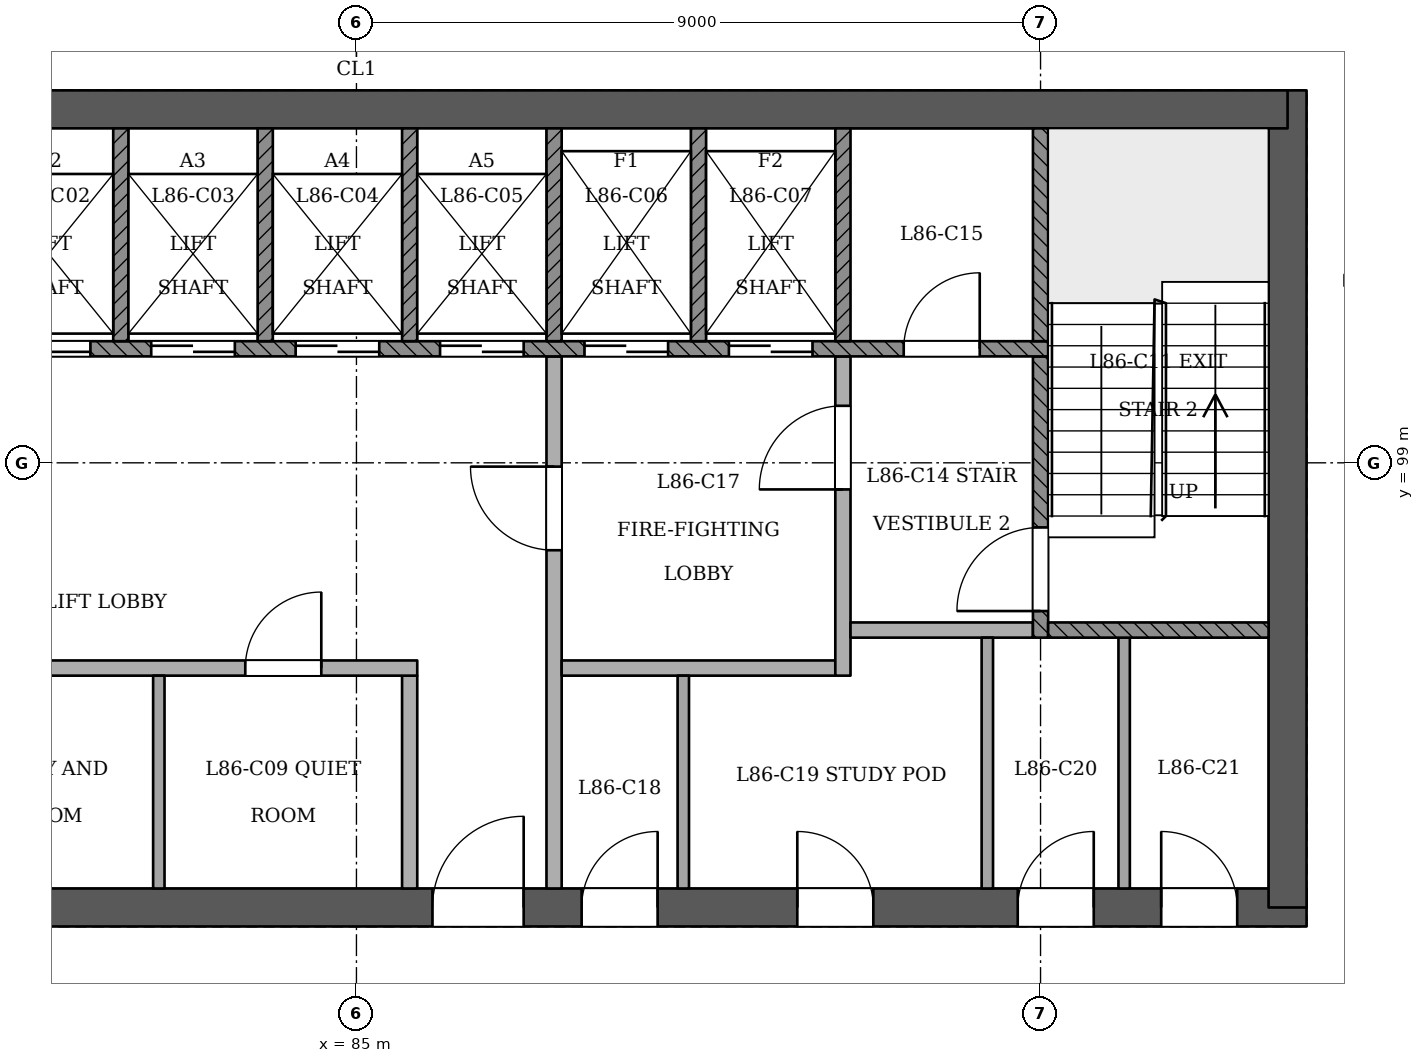
"""IFC4 building model, lengths in metres.
Left out: names, types, materials, properties, quantities, classifications, styles, units other than length and angle.
Written with IfcOpenShell. Run it as: python <this file> out.ifc"""

import sys

from ifc_helpers import new_model, si_unit, direction, frame, frame_2d, origin, place, context, subcontext, project, spatial, rectangle, extrude, element, fill, save


model = new_model("IFC4")
c1 = context("Model", 3, precision=1e-05, world=origin(), true_north=direction((0.0, 1.0)))
c2 = subcontext(c1, "Body", "Model", "MODEL_VIEW")
j1 = project(units=[si_unit("LENGTHUNIT", "METRE"), si_unit("PLANEANGLEUNIT", "RADIAN")], contexts=[c1])
p1 = place(None, origin())
s1 = spatial("IfcSite", under=j1, at=p1, CompositionType="ELEMENT")
p2 = place(p1, origin())
s2 = spatial("IfcBuilding", under=s1, at=p2, CompositionType="ELEMENT")
p3 = place(p2, frame((0.0, 0.0, 331.0)))
s3 = spatial("IfcBuildingStorey", under=s2, at=p3, CompositionType="ELEMENT", Elevation=331.0)
p4 = place(p3, frame((72.75, 93.15, 0.0), z_axis=(0.0, 0.0, 1.0), x_axis=(1.0, 0.0, 0.0)))
e1 = element("IfcWall", 1, at=p4, inside=s3, PredefinedType="SHEAR", context=c2, shape_type="SweptSolid", body=[
    extrude(rectangle(XDim=24.75, YDim=0.5, at=frame_2d((12.375, 0.0))), origin(), (0.0, 0.0, 1.0), 3.6),
])
p5 = place(p4, frame((1.05, 0.0, 0.0)))
e2 = element("IfcOpeningElement", 2, at=p5, cuts=e1, PredefinedType="OPENING", context=c2, shape_type="SweptSolid", body=[
    extrude(rectangle(XDim=1.2, YDim=2.1, at=frame_2d((0.6, 1.05))), frame((0.0, 0.26, 0.0), z_axis=(0.0, -1.0, 0.0), x_axis=(1.0, 0.0, 0.0)), (0.0, 0.0, 1.0), 0.521),
])
p6 = place(p4, frame((3.25, 0.0, 0.0)))
e3 = element("IfcOpeningElement", 3, at=p6, cuts=e1, PredefinedType="OPENING", context=c2, shape_type="SweptSolid", body=[
    extrude(rectangle(XDim=1.2, YDim=2.1, at=frame_2d((0.6, 1.05))), frame((0.0, 0.26, 0.0), z_axis=(0.0, -1.0, 0.0), x_axis=(1.0, 0.0, 0.0)), (0.0, 0.0, 1.0), 0.521),
])
p7 = place(p4, frame((13.25, 0.0, 0.0)))
e4 = element("IfcOpeningElement", 4, at=p7, cuts=e1, PredefinedType="OPENING", context=c2, shape_type="SweptSolid", body=[
    extrude(rectangle(XDim=1.2, YDim=2.1, at=frame_2d((0.6, 1.05))), frame((0.0, 0.26, 0.0), z_axis=(0.0, -1.0, 0.0), x_axis=(1.0, 0.0, 0.0)), (0.0, 0.0, 1.0), 0.521),
])
p8 = place(p4, frame((15.212, 0.0, 0.0)))
e5 = element("IfcOpeningElement", 5, at=p8, cuts=e1, PredefinedType="OPENING", context=c2, shape_type="SweptSolid", body=[
    extrude(rectangle(XDim=1.0, YDim=2.1, at=frame_2d((0.5, 1.05))), frame((0.0, 0.26, 0.0), z_axis=(0.0, -1.0, 0.0), x_axis=(1.0, 0.0, 0.0)), (0.0, 0.0, 1.0), 0.521),
])
p9 = place(p4, frame((18.05, 0.0, 0.0)))
e6 = element("IfcOpeningElement", 6, at=p9, cuts=e1, PredefinedType="OPENING", context=c2, shape_type="SweptSolid", body=[
    extrude(rectangle(XDim=1.0, YDim=2.1, at=frame_2d((0.5, 1.05))), frame((0.0, 0.26, 0.0), z_axis=(0.0, -1.0, 0.0), x_axis=(1.0, 0.0, 0.0)), (0.0, 0.0, 1.0), 0.521),
])
p10 = place(p4, frame((20.95, 0.0, 0.0)))
e7 = element("IfcOpeningElement", 7, at=p10, cuts=e1, PredefinedType="OPENING", context=c2, shape_type="SweptSolid", body=[
    extrude(rectangle(XDim=1.0, YDim=2.1, at=frame_2d((0.5, 1.05))), frame((0.0, 0.26, 0.0), z_axis=(0.0, -1.0, 0.0), x_axis=(1.0, 0.0, 0.0)), (0.0, 0.0, 1.0), 0.521),
])
p11 = place(p4, frame((22.837, 0.0, 0.0)))
e8 = element("IfcOpeningElement", 8, at=p11, cuts=e1, PredefinedType="OPENING", context=c2, shape_type="SweptSolid", body=[
    extrude(rectangle(XDim=1.0, YDim=2.1, at=frame_2d((0.5, 1.05))), frame((0.0, 0.26, 0.0), z_axis=(0.0, -1.0, 0.0), x_axis=(1.0, 0.0, 0.0)), (0.0, 0.0, 1.0), 0.521),
])
p12 = place(p3, frame((97.25, 93.15, 0.0), z_axis=(0.0, 0.0, 1.0), x_axis=(0.0, 1.0, 0.0)))
e9 = element("IfcWall", 9, at=p12, inside=s3, PredefinedType="SHEAR", context=c2, shape_type="SweptSolid", body=[
    extrude(rectangle(XDim=10.75, YDim=0.5, at=frame_2d((5.375, 0.0))), origin(), (0.0, 0.0, 1.0), 3.6),
])
p13 = place(p3, frame((97.25, 103.65, 0.0), z_axis=(0.0, 0.0, 1.0), x_axis=(-1.0, 0.0, 0.0)))
e10 = element("IfcWall", 10, at=p13, inside=s3, PredefinedType="SHEAR", context=c2, shape_type="SweptSolid", body=[
    extrude(rectangle(XDim=24.75, YDim=0.5, at=frame_2d((12.375, 0.0))), origin(), (0.0, 0.0, 1.0), 3.6),
])
p14 = place(p3, frame((82.4, 93.4, 0.0), z_axis=(0.0, 0.0, 1.0), x_axis=(0.0, 1.0, 0.0)))
e11 = element("IfcWall", 11, at=p14, inside=s3, PredefinedType="PARTITIONING", context=c2, shape_type="SweptSolid", body=[
    extrude(rectangle(XDim=2.8, YDim=0.15, at=frame_2d((1.4, 0.0))), origin(), (0.0, 0.0, 1.0), 3.3),
])
p15 = place(p3, frame((85.7, 93.4, 0.0), z_axis=(0.0, 0.0, 1.0), x_axis=(0.0, 1.0, 0.0)))
e12 = element("IfcWall", 12, at=p15, inside=s3, PredefinedType="PARTITIONING", context=c2, shape_type="SweptSolid", body=[
    extrude(rectangle(XDim=2.8, YDim=0.2, at=frame_2d((1.4, 0.0))), origin(), (0.0, 0.0, 1.0), 3.3),
])
p16 = place(p3, frame((87.6, 93.4, 0.0), z_axis=(0.0, 0.0, 1.0), x_axis=(0.0, 1.0, 0.0)))
e13 = element("IfcWall", 13, at=p16, inside=s3, PredefinedType="PARTITIONING", context=c2, shape_type="SweptSolid", body=[
    extrude(rectangle(XDim=7.0, YDim=0.2, at=frame_2d((3.5, 0.0))), origin(), (0.0, 0.0, 1.0), 3.3),
])
p17 = place(p16, frame((4.45, 0.0, 0.0)))
e14 = element("IfcOpeningElement", 14, at=p17, cuts=e13, PredefinedType="OPENING", context=c2, shape_type="SweptSolid", body=[
    extrude(rectangle(XDim=1.1, YDim=2.1, at=frame_2d((0.55, 1.05))), frame((0.0, 0.11, 0.0), z_axis=(0.0, -1.0, 0.0), x_axis=(1.0, 0.0, 0.0)), (0.0, 0.0, 1.0), 0.221),
])
p18 = place(p3, frame((89.3, 93.4, 0.0), z_axis=(0.0, 0.0, 1.0), x_axis=(0.0, 1.0, 0.0)))
e15 = element("IfcWall", 15, at=p18, inside=s3, PredefinedType="PARTITIONING", context=c2, shape_type="SweptSolid", body=[
    extrude(rectangle(XDim=2.8, YDim=0.15, at=frame_2d((1.4, 0.0))), origin(), (0.0, 0.0, 1.0), 3.3),
])
for number, where, z_axis, x_axis in (
    (16, (93.3, 93.4, 0.0), (0.0, 0.0, 1.0), (0.0, 1.0, 0.0)),
    (17, (95.1, 93.4, 0.0), (0.0, 0.0, 1.0), (0.0, 1.0, 0.0)),
):
    element("IfcWall", number, at=place(p3, frame(where, z_axis=z_axis, x_axis=x_axis)), inside=s3, PredefinedType="PARTITIONING", context=c2, shape_type="SweptSolid", body=[
        extrude(rectangle(XDim=3.3, YDim=0.15, at=frame_2d((1.65, 0.0))), origin(), (0.0, 0.0, 1.0), 3.3),
    ])
p19 = place(p3, frame((78.0, 96.3, 0.0), z_axis=(0.0, 0.0, 1.0), x_axis=(1.0, 0.0, 0.0)))
e18 = element("IfcWall", 18, at=p19, inside=s3, PredefinedType="PARTITIONING", context=c2, shape_type="SweptSolid", body=[
    extrude(rectangle(XDim=7.8, YDim=0.2, at=frame_2d((3.9, 0.0))), origin(), (0.0, 0.0, 1.0), 3.3),
])
p20 = place(p19, frame((1.762, 0.0, 0.0)))
e19 = element("IfcOpeningElement", 19, at=p20, cuts=e18, PredefinedType="OPENING", context=c2, shape_type="SweptSolid", body=[
    extrude(rectangle(XDim=1.0, YDim=2.1, at=frame_2d((0.5, 1.05))), frame((0.0, 0.11, 0.0), z_axis=(0.0, -1.0, 0.0), x_axis=(1.0, 0.0, 0.0)), (0.0, 0.0, 1.0), 0.221),
])
p21 = place(p19, frame((5.538, 0.0, 0.0)))
e20 = element("IfcOpeningElement", 20, at=p21, cuts=e18, PredefinedType="OPENING", context=c2, shape_type="SweptSolid", body=[
    extrude(rectangle(XDim=1.0, YDim=2.1, at=frame_2d((0.5, 1.05))), frame((0.0, 0.11, 0.0), z_axis=(0.0, -1.0, 0.0), x_axis=(1.0, 0.0, 0.0)), (0.0, 0.0, 1.0), 0.221),
])
p22 = place(p3, frame((87.7, 96.3, 0.0), z_axis=(0.0, 0.0, 1.0), x_axis=(1.0, 0.0, 0.0)))
e21 = element("IfcWall", 21, at=p22, inside=s3, PredefinedType="PARTITIONING", context=c2, shape_type="SweptSolid", body=[
    extrude(rectangle(XDim=3.6, YDim=0.2, at=frame_2d((1.8, 0.0))), origin(), (0.0, 0.0, 1.0), 3.3),
])
p23 = place(p3, frame((91.4, 96.2, 0.0), z_axis=(0.0, 0.0, 1.0), x_axis=(0.0, 1.0, 0.0)))
e22 = element("IfcWall", 22, at=p23, inside=s3, PredefinedType="PARTITIONING", context=c2, shape_type="SweptSolid", body=[
    extrude(rectangle(XDim=4.2, YDim=0.2, at=frame_2d((2.1, 0.0))), origin(), (0.0, 0.0, 1.0), 3.3),
])
p24 = place(p23, frame((2.45, 0.0, 0.0)))
e23 = element("IfcOpeningElement", 23, at=p24, cuts=e22, PredefinedType="OPENING", context=c2, shape_type="SweptSolid", body=[
    extrude(rectangle(XDim=1.1, YDim=2.1, at=frame_2d((0.55, 1.05))), frame((0.0, 0.11, 0.0), z_axis=(0.0, -1.0, 0.0), x_axis=(1.0, 0.0, 0.0)), (0.0, 0.0, 1.0), 0.221),
])
p25 = place(p3, frame((91.5, 96.8, 0.0), z_axis=(0.0, 0.0, 1.0), x_axis=(1.0, 0.0, 0.0)))
e24 = element("IfcWall", 24, at=p25, inside=s3, PredefinedType="PARTITIONING", context=c2, shape_type="SweptSolid", body=[
    extrude(rectangle(XDim=2.4, YDim=0.2, at=frame_2d((1.2, 0.0))), origin(), (0.0, 0.0, 1.0), 3.3),
])
p26 = place(p3, frame((94.0, 96.7, 0.0), z_axis=(0.0, 0.0, 1.0), x_axis=(0.0, 1.0, 0.0)))
e25 = element("IfcWall", 25, at=p26, inside=s3, PredefinedType="SOLIDWALL", context=c2, shape_type="SweptSolid", body=[
    extrude(rectangle(XDim=3.7, YDim=0.2, at=frame_2d((1.85, 0.0))), origin(), (0.0, 0.0, 1.0), 3.3),
])
p27 = place(p26, frame((0.35, 0.0, 0.0)))
e26 = element("IfcOpeningElement", 26, at=p27, cuts=e25, PredefinedType="OPENING", context=c2, shape_type="SweptSolid", body=[
    extrude(rectangle(XDim=1.1, YDim=2.1, at=frame_2d((0.55, 1.05))), frame((0.0, 0.11, 0.0), z_axis=(0.0, -1.0, 0.0), x_axis=(1.0, 0.0, 0.0)), (0.0, 0.0, 1.0), 0.221),
])
p28 = place(p3, frame((94.1, 96.8, 0.0), z_axis=(0.0, 0.0, 1.0), x_axis=(1.0, 0.0, 0.0)))
e27 = element("IfcWall", 27, at=p28, inside=s3, PredefinedType="SOLIDWALL", context=c2, shape_type="SweptSolid", body=[
    extrude(rectangle(XDim=2.9, YDim=0.2, at=frame_2d((1.45, 0.0))), origin(), (0.0, 0.0, 1.0), 3.3),
])
p29 = place(p3, frame((75.9, 100.5, 0.0), z_axis=(0.0, 0.0, 1.0), x_axis=(1.0, 0.0, 0.0)))
e28 = element("IfcWall", 28, at=p29, inside=s3, PredefinedType="SOLIDWALL", context=c2, shape_type="SweptSolid", body=[
    extrude(rectangle(XDim=18.2, YDim=0.2, at=frame_2d((9.1, 0.0))), origin(), (0.0, 0.0, 1.0), 3.3),
])
p30 = place(p29, frame((2.6, 0.0, 0.0)))
e29 = element("IfcOpeningElement", 29, at=p30, cuts=e28, PredefinedType="OPENING", context=c2, shape_type="SweptSolid", body=[
    extrude(rectangle(XDim=1.1, YDim=2.1, at=frame_2d((0.55, 1.05))), frame((0.0, 0.11, 0.0), z_axis=(0.0, -1.0, 0.0), x_axis=(1.0, 0.0, 0.0)), (0.0, 0.0, 1.0), 0.221),
])
p31 = place(p29, frame((4.5, 0.0, 0.0)))
e30 = element("IfcOpeningElement", 30, at=p31, cuts=e28, PredefinedType="OPENING", context=c2, shape_type="SweptSolid", body=[
    extrude(rectangle(XDim=1.1, YDim=2.1, at=frame_2d((0.55, 1.05))), frame((0.0, 0.11, 0.0), z_axis=(0.0, -1.0, 0.0), x_axis=(1.0, 0.0, 0.0)), (0.0, 0.0, 1.0), 0.221),
])
p32 = place(p29, frame((6.4, 0.0, 0.0)))
e31 = element("IfcOpeningElement", 31, at=p32, cuts=e28, PredefinedType="OPENING", context=c2, shape_type="SweptSolid", body=[
    extrude(rectangle(XDim=1.1, YDim=2.1, at=frame_2d((0.55, 1.05))), frame((0.0, 0.11, 0.0), z_axis=(0.0, -1.0, 0.0), x_axis=(1.0, 0.0, 0.0)), (0.0, 0.0, 1.0), 0.221),
])
p33 = place(p29, frame((8.3, 0.0, 0.0)))
e32 = element("IfcOpeningElement", 32, at=p33, cuts=e28, PredefinedType="OPENING", context=c2, shape_type="SweptSolid", body=[
    extrude(rectangle(XDim=1.1, YDim=2.1, at=frame_2d((0.55, 1.05))), frame((0.0, 0.11, 0.0), z_axis=(0.0, -1.0, 0.0), x_axis=(1.0, 0.0, 0.0)), (0.0, 0.0, 1.0), 0.221),
])
p34 = place(p29, frame((10.2, 0.0, 0.0)))
e33 = element("IfcOpeningElement", 33, at=p34, cuts=e28, PredefinedType="OPENING", context=c2, shape_type="SweptSolid", body=[
    extrude(rectangle(XDim=1.1, YDim=2.1, at=frame_2d((0.55, 1.05))), frame((0.0, 0.11, 0.0), z_axis=(0.0, -1.0, 0.0), x_axis=(1.0, 0.0, 0.0)), (0.0, 0.0, 1.0), 0.221),
])
p35 = place(p29, frame((12.1, 0.0, 0.0)))
e34 = element("IfcOpeningElement", 34, at=p35, cuts=e28, PredefinedType="OPENING", context=c2, shape_type="SweptSolid", body=[
    extrude(rectangle(XDim=1.1, YDim=2.1, at=frame_2d((0.55, 1.05))), frame((0.0, 0.11, 0.0), z_axis=(0.0, -1.0, 0.0), x_axis=(1.0, 0.0, 0.0)), (0.0, 0.0, 1.0), 0.221),
])
p36 = place(p29, frame((14.0, 0.0, 0.0)))
e35 = element("IfcOpeningElement", 35, at=p36, cuts=e28, PredefinedType="OPENING", context=c2, shape_type="SweptSolid", body=[
    extrude(rectangle(XDim=1.1, YDim=2.1, at=frame_2d((0.55, 1.05))), frame((0.0, 0.11, 0.0), z_axis=(0.0, -1.0, 0.0), x_axis=(1.0, 0.0, 0.0)), (0.0, 0.0, 1.0), 0.221),
])
p37 = place(p29, frame((0.65, 0.0, 0.0)))
e36 = element("IfcOpeningElement", 36, at=p37, cuts=e28, PredefinedType="OPENING", context=c2, shape_type="SweptSolid", body=[
    extrude(rectangle(XDim=1.0, YDim=2.1, at=frame_2d((0.5, 1.05))), frame((0.0, 0.11, 0.0), z_axis=(0.0, -1.0, 0.0), x_axis=(1.0, 0.0, 0.0)), (0.0, 0.0, 1.0), 0.221),
])
p38 = place(p29, frame((16.3, 0.0, 0.0)))
e37 = element("IfcOpeningElement", 37, at=p38, cuts=e28, PredefinedType="OPENING", context=c2, shape_type="SweptSolid", body=[
    extrude(rectangle(XDim=1.0, YDim=2.1, at=frame_2d((0.5, 1.05))), frame((0.0, 0.11, 0.0), z_axis=(0.0, -1.0, 0.0), x_axis=(1.0, 0.0, 0.0)), (0.0, 0.0, 1.0), 0.221),
])
for number, where, z_axis, x_axis in (
    (38, (81.9, 100.6, 0.0), (0.0, 0.0, 1.0), (0.0, 1.0, 0.0)),
    (39, (83.8, 100.6, 0.0), (0.0, 0.0, 1.0), (0.0, 1.0, 0.0)),
    (40, (85.7, 100.6, 0.0), (0.0, 0.0, 1.0), (0.0, 1.0, 0.0)),
    (41, (87.6, 100.6, 0.0), (0.0, 0.0, 1.0), (0.0, 1.0, 0.0)),
    (42, (89.5, 100.6, 0.0), (0.0, 0.0, 1.0), (0.0, 1.0, 0.0)),
    (43, (91.4, 100.6, 0.0), (0.0, 0.0, 1.0), (0.0, 1.0, 0.0)),
    (44, (94.0, 100.6, 0.0), (0.0, 0.0, 1.0), (0.0, 1.0, 0.0)),
):
    element("IfcWall", number, at=place(p3, frame(where, z_axis=z_axis, x_axis=x_axis)), inside=s3, PredefinedType="SOLIDWALL", context=c2, shape_type="SweptSolid", body=[
        extrude(rectangle(XDim=2.8, YDim=0.2, at=frame_2d((1.4, 0.0))), origin(), (0.0, 0.0, 1.0), 3.3),
    ])
p39 = place(p31, origin())
e45 = element("IfcDoor", 45, at=p39, inside=s3, OperationType="SLIDING_TO_LEFT", PredefinedType="NOTDEFINED", context=c2, shape_type="SweptSolid", body=[
    extrude(rectangle(XDim=1.1, YDim=2.1, at=frame_2d((0.55, 1.05))), frame((0.0, 0.025, 0.0), z_axis=(0.0, -1.0, 0.0), x_axis=(1.0, 0.0, 0.0)), (0.0, 0.0, 1.0), 0.05),
])
fill(e30, e45)
p40 = place(p32, origin())
e46 = element("IfcDoor", 46, at=p40, inside=s3, OperationType="SLIDING_TO_RIGHT", PredefinedType="NOTDEFINED", context=c2, shape_type="SweptSolid", body=[
    extrude(rectangle(XDim=1.1, YDim=2.1, at=frame_2d((0.55, 1.05))), frame((0.0, 0.025, 0.0), z_axis=(0.0, -1.0, 0.0), x_axis=(1.0, 0.0, 0.0)), (0.0, 0.0, 1.0), 0.05),
])
fill(e31, e46)
p41 = place(p33, origin())
e47 = element("IfcDoor", 47, at=p41, inside=s3, OperationType="SLIDING_TO_LEFT", PredefinedType="NOTDEFINED", context=c2, shape_type="SweptSolid", body=[
    extrude(rectangle(XDim=1.1, YDim=2.1, at=frame_2d((0.55, 1.05))), frame((0.0, 0.025, 0.0), z_axis=(0.0, -1.0, 0.0), x_axis=(1.0, 0.0, 0.0)), (0.0, 0.0, 1.0), 0.05),
])
fill(e32, e47)
p42 = place(p34, origin())
e48 = element("IfcDoor", 48, at=p42, inside=s3, OperationType="SLIDING_TO_RIGHT", PredefinedType="NOTDEFINED", context=c2, shape_type="SweptSolid", body=[
    extrude(rectangle(XDim=1.1, YDim=2.1, at=frame_2d((0.55, 1.05))), frame((0.0, 0.025, 0.0), z_axis=(0.0, -1.0, 0.0), x_axis=(1.0, 0.0, 0.0)), (0.0, 0.0, 1.0), 0.05),
])
fill(e33, e48)
p43 = place(p35, origin())
e49 = element("IfcDoor", 49, at=p43, inside=s3, OperationType="SLIDING_TO_RIGHT", PredefinedType="NOTDEFINED", context=c2, shape_type="SweptSolid", body=[
    extrude(rectangle(XDim=1.1, YDim=2.1, at=frame_2d((0.55, 1.05))), frame((0.0, 0.025, 0.0), z_axis=(0.0, -1.0, 0.0), x_axis=(1.0, 0.0, 0.0)), (0.0, 0.0, 1.0), 0.05),
])
fill(e34, e49)
p44 = place(p36, origin())
e50 = element("IfcDoor", 50, at=p44, inside=s3, OperationType="SLIDING_TO_LEFT", PredefinedType="NOTDEFINED", context=c2, shape_type="SweptSolid", body=[
    extrude(rectangle(XDim=1.1, YDim=2.1, at=frame_2d((0.55, 1.05))), frame((0.0, 0.025, 0.0), z_axis=(0.0, -1.0, 0.0), x_axis=(1.0, 0.0, 0.0)), (0.0, 0.0, 1.0), 0.05),
])
fill(e35, e50)
p45 = place(p27, origin())
e51 = element("IfcDoor", 51, at=p45, inside=s3, OperationType="SINGLE_SWING_LEFT", PredefinedType="NOTDEFINED", context=c2, shape_type="SweptSolid", body=[
    extrude(rectangle(XDim=1.1, YDim=2.1, at=frame_2d((0.55, 1.05))), frame((0.0, 0.025, 0.0), z_axis=(0.0, -1.0, 0.0), x_axis=(1.0, 0.0, 0.0)), (0.0, 0.0, 1.0), 0.05),
])
fill(e26, e51)
p46 = place(p17, origin())
e52 = element("IfcDoor", 52, at=p46, inside=s3, OperationType="SINGLE_SWING_RIGHT", PredefinedType="NOTDEFINED", context=c2, shape_type="SweptSolid", body=[
    extrude(rectangle(XDim=1.1, YDim=2.1, at=frame_2d((0.55, 1.05))), frame((0.0, 0.025, 0.0), z_axis=(0.0, -1.0, 0.0), x_axis=(1.0, 0.0, 0.0)), (0.0, 0.0, 1.0), 0.05),
])
fill(e14, e52)
p47 = place(p24, origin())
e53 = element("IfcDoor", 53, at=p47, inside=s3, OperationType="SINGLE_SWING_LEFT", PredefinedType="NOTDEFINED", context=c2, shape_type="SweptSolid", body=[
    extrude(rectangle(XDim=1.1, YDim=2.1, at=frame_2d((0.55, 1.05))), frame((0.0, 0.025, 0.0), z_axis=(0.0, -1.0, 0.0), x_axis=(1.0, 0.0, 0.0)), (0.0, 0.0, 1.0), 0.05),
])
fill(e23, e53)
p48 = place(p7, origin())
e54 = element("IfcDoor", 54, at=p48, inside=s3, OperationType="SINGLE_SWING_RIGHT", PredefinedType="NOTDEFINED", context=c2, shape_type="SweptSolid", body=[
    extrude(rectangle(XDim=1.2, YDim=2.1, at=frame_2d((0.6, 1.05))), frame((0.0, 0.025, 0.0), z_axis=(0.0, -1.0, 0.0), x_axis=(1.0, 0.0, 0.0)), (0.0, 0.0, 1.0), 0.05),
])
fill(e4, e54)
p49 = place(p38, origin())
e55 = element("IfcDoor", 55, at=p49, inside=s3, OperationType="SINGLE_SWING_RIGHT", PredefinedType="NOTDEFINED", context=c2, shape_type="SweptSolid", body=[
    extrude(rectangle(XDim=1.0, YDim=2.1, at=frame_2d((0.5, 1.05))), frame((0.0, 0.025, 0.0), z_axis=(0.0, -1.0, 0.0), x_axis=(1.0, 0.0, 0.0)), (0.0, 0.0, 1.0), 0.05),
])
fill(e37, e55)
p50 = place(p8, origin())
e56 = element("IfcDoor", 56, at=p50, inside=s3, OperationType="SINGLE_SWING_RIGHT", PredefinedType="NOTDEFINED", context=c2, shape_type="SweptSolid", body=[
    extrude(rectangle(XDim=1.0, YDim=2.1, at=frame_2d((0.5, 1.05))), frame((0.0, 0.025, 0.0), z_axis=(0.0, -1.0, 0.0), x_axis=(1.0, 0.0, 0.0)), (0.0, 0.0, 1.0), 0.05),
])
fill(e5, e56)
p51 = place(p9, origin())
e57 = element("IfcDoor", 57, at=p51, inside=s3, OperationType="SINGLE_SWING_LEFT", PredefinedType="NOTDEFINED", context=c2, shape_type="SweptSolid", body=[
    extrude(rectangle(XDim=1.0, YDim=2.1, at=frame_2d((0.5, 1.05))), frame((0.0, 0.025, 0.0), z_axis=(0.0, -1.0, 0.0), x_axis=(1.0, 0.0, 0.0)), (0.0, 0.0, 1.0), 0.05),
])
fill(e6, e57)
p52 = place(p10, origin())
e58 = element("IfcDoor", 58, at=p52, inside=s3, OperationType="SINGLE_SWING_RIGHT", PredefinedType="NOTDEFINED", context=c2, shape_type="SweptSolid", body=[
    extrude(rectangle(XDim=1.0, YDim=2.1, at=frame_2d((0.5, 1.05))), frame((0.0, 0.025, 0.0), z_axis=(0.0, -1.0, 0.0), x_axis=(1.0, 0.0, 0.0)), (0.0, 0.0, 1.0), 0.05),
])
fill(e7, e58)
p53 = place(p11, origin())
e59 = element("IfcDoor", 59, at=p53, inside=s3, OperationType="SINGLE_SWING_LEFT", PredefinedType="NOTDEFINED", context=c2, shape_type="SweptSolid", body=[
    extrude(rectangle(XDim=1.0, YDim=2.1, at=frame_2d((0.5, 1.05))), frame((0.0, 0.025, 0.0), z_axis=(0.0, -1.0, 0.0), x_axis=(1.0, 0.0, 0.0)), (0.0, 0.0, 1.0), 0.05),
])
fill(e8, e59)
p54 = place(p21, origin())
e60 = element("IfcDoor", 60, at=p54, inside=s3, OperationType="SINGLE_SWING_RIGHT", PredefinedType="NOTDEFINED", context=c2, shape_type="SweptSolid", body=[
    extrude(rectangle(XDim=1.0, YDim=2.1, at=frame_2d((0.5, 1.05))), frame((0.0, 0.025, 0.0), z_axis=(0.0, -1.0, 0.0), x_axis=(1.0, 0.0, 0.0)), (0.0, 0.0, 1.0), 0.05),
])
fill(e20, e60)
save(model, sys.argv[1])
